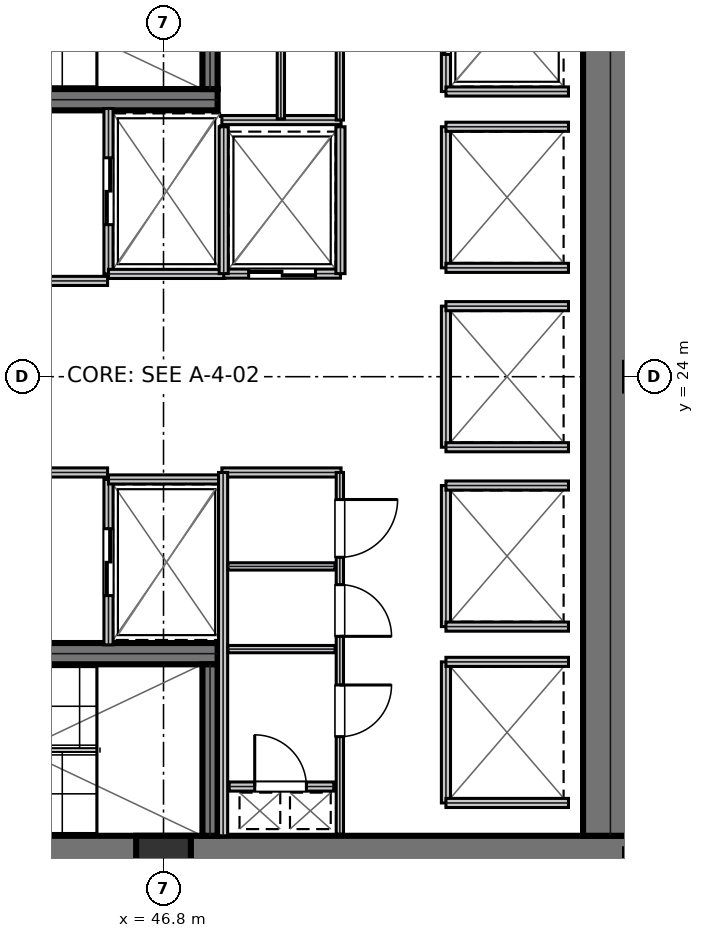
"""IFC4 building model, lengths in metres.
Left out: names, types, materials, properties, quantities, classifications, styles, units other than length and angle.
Written with IfcOpenShell. Run it as: python <this file> out.ifc"""

import sys

from ifc_helpers import new_model, si_unit, direction, frame, frame_2d, origin, origin_2d, place, context, subcontext, project, spatial, rectangle, extrude, element, fill, save


model = new_model("IFC4")
c1 = context("Model", 3, precision=1e-05, world=origin(), true_north=direction((0.0, 1.0)))
c2 = subcontext(c1, "Body", "Model", "MODEL_VIEW")
j1 = project(units=[si_unit("LENGTHUNIT", "METRE"), si_unit("PLANEANGLEUNIT", "RADIAN")], contexts=[c1])
p1 = place(None, origin())
s1 = spatial("IfcSite", under=j1, at=p1, CompositionType="ELEMENT")
p2 = place(p1, origin())
s2 = spatial("IfcBuilding", under=s1, at=p2, CompositionType="ELEMENT")
p3 = place(p2, frame((0.0, 0.0, 16.2)))
s3 = spatial("IfcBuildingStorey", under=s2, at=p3, CompositionType="ELEMENT", Elevation=16.2)
p4 = place(p3, frame((38.8, 16.0, 0.0), z_axis=(0.0, 0.0, 1.0), x_axis=(1.0, 0.0, 0.0)))
e1 = element("IfcWall", 1, at=p4, inside=s3, PredefinedType="SHEAR", context=c2, shape_type="SweptSolid", body=[
    extrude(rectangle(XDim=16.0, YDim=0.9, at=frame_2d((8.0, 0.0))), origin(), (0.0, 0.0, 1.0), 5.12),
])
p5 = place(p3, frame((54.15, 16.45, 0.0), z_axis=(0.0, 0.0, 1.0), x_axis=(0.0, 1.0, 0.0)))
e2 = element("IfcWall", 2, at=p5, inside=s3, PredefinedType="SHEAR", context=c2, shape_type="SweptSolid", body=[
    extrude(rectangle(XDim=15.1, YDim=0.9, at=frame_2d((7.55, 0.0))), origin(), (0.0, 0.0, 1.0), 5.12),
])
p6 = place(p3, frame((39.98, 28.555, 0.0), z_axis=(0.0, 0.0, 1.0), x_axis=(1.0, 0.0, 0.0)))
e3 = element("IfcWall", 3, at=p6, inside=s3, PredefinedType="SHEAR", context=c2, shape_type="SweptSolid", body=[
    extrude(rectangle(XDim=7.71, YDim=0.35, at=frame_2d((3.855, 0.0))), origin(), (0.0, 0.0, 1.0), 5.12),
])
p7 = place(p6, frame((0.25, 0.0, 0.0)))
e4 = element("IfcOpeningElement", 4, at=p7, cuts=e3, PredefinedType="OPENING", context=c2, shape_type="SweptSolid", body=[
    extrude(rectangle(XDim=1.1, YDim=2.15, at=frame_2d((0.55, 1.075))), frame((0.0, 0.185, 0.0), z_axis=(0.0, -1.0, 0.0), x_axis=(1.0, 0.0, 0.0)), (0.0, 0.0, 1.0), 0.37),
])
p8 = place(p3, frame((39.98, 19.445, 0.0), z_axis=(0.0, 0.0, 1.0), x_axis=(1.0, 0.0, 0.0)))
e5 = element("IfcWall", 5, at=p8, inside=s3, PredefinedType="SHEAR", context=c2, shape_type="SweptSolid", body=[
    extrude(rectangle(XDim=7.71, YDim=0.35, at=frame_2d((3.855, 0.0))), origin(), (0.0, 0.0, 1.0), 5.12),
])
p9 = place(p8, frame((0.25, 0.0, 0.0)))
e6 = element("IfcOpeningElement", 6, at=p9, cuts=e5, PredefinedType="OPENING", context=c2, shape_type="SweptSolid", body=[
    extrude(rectangle(XDim=1.1, YDim=2.15, at=frame_2d((0.55, 1.075))), frame((0.0, 0.185, 0.0), z_axis=(0.0, -1.0, 0.0), x_axis=(1.0, 0.0, 0.0)), (0.0, 0.0, 1.0), 0.37),
])
for number, where, z_axis, x_axis in (
    (7, (47.565, 28.73, 0.0), (0.0, 0.0, 1.0), (0.0, 1.0, 0.0)),
    (8, (47.565, 16.45, 0.0), (0.0, 0.0, 1.0), (0.0, 1.0, 0.0)),
):
    element("IfcWall", number, at=place(p3, frame(where, z_axis=z_axis, x_axis=x_axis)), inside=s3, PredefinedType="SHEAR", context=c2, shape_type="SweptSolid", body=[
        extrude(rectangle(XDim=2.82, YDim=0.25, at=frame_2d((1.41, 0.0))), origin(), (0.0, 0.0, 1.0), 5.12),
    ])
p10 = place(p3, frame((46.8, 16.0, 0.0), z_axis=(0.0, 0.0, 1.0), x_axis=(1.0, 0.0, 0.0)))
e9 = element("IfcColumn", 9, at=p10, inside=s3, PredefinedType="COLUMN", context=c2, shape_type="SweptSolid", body=[
    extrude(rectangle(XDim=0.9, YDim=0.9, at=origin_2d()), origin(), (0.0, 0.0, 1.0), 5.395),
])
p11 = place(p3, frame((39.98, 25.575, 0.0), z_axis=(0.0, 0.0, 1.0), x_axis=(1.0, 0.0, 0.0)))
e10 = element("IfcWall", 10, at=p11, inside=s3, PredefinedType="PARTITIONING", context=c2, shape_type="SweptSolid", body=[
    extrude(rectangle(XDim=5.9, YDim=0.15, at=frame_2d((2.95, 0.0))), origin(), (0.0, 0.0, 1.0), 5.12),
])
p12 = place(p11, frame((2.35, 0.0, 0.0)))
e11 = element("IfcOpeningElement", 11, at=p12, cuts=e10, PredefinedType="OPENING", context=c2, shape_type="SweptSolid", body=[
    extrude(rectangle(XDim=1.05, YDim=2.15, at=frame_2d((0.525, 1.075))), frame((0.0, 0.085, 0.0), z_axis=(0.0, -1.0, 0.0), x_axis=(1.0, 0.0, 0.0)), (0.0, 0.0, 1.0), 0.17),
])
p13 = place(p3, frame((39.98, 22.425, 0.0), z_axis=(0.0, 0.0, 1.0), x_axis=(1.0, 0.0, 0.0)))
e12 = element("IfcWall", 12, at=p13, inside=s3, PredefinedType="PARTITIONING", context=c2, shape_type="SweptSolid", body=[
    extrude(rectangle(XDim=5.9, YDim=0.15, at=frame_2d((2.95, 0.0))), origin(), (0.0, 0.0, 1.0), 5.12),
])
p14 = place(p13, frame((2.35, 0.0, 0.0)))
e13 = element("IfcOpeningElement", 13, at=p14, cuts=e12, PredefinedType="OPENING", context=c2, shape_type="SweptSolid", body=[
    extrude(rectangle(XDim=1.05, YDim=2.15, at=frame_2d((0.525, 1.075))), frame((0.0, 0.085, 0.0), z_axis=(0.0, -1.0, 0.0), x_axis=(1.0, 0.0, 0.0)), (0.0, 0.0, 1.0), 0.17),
])
p15 = place(p3, frame((45.895, 25.69, 0.0), z_axis=(0.0, 0.0, 1.0), x_axis=(0.0, 1.0, 0.0)))
e14 = element("IfcWall", 14, at=p15, inside=s3, PredefinedType="PARTITIONING", context=c2, shape_type="SweptSolid", body=[
    extrude(rectangle(XDim=2.72, YDim=0.15, at=frame_2d((1.36, 0.0))), origin(), (0.0, 0.0, 1.0), 5.12),
])
p16 = place(p15, frame((0.81, 0.0, 0.0)))
e15 = element("IfcOpeningElement", 15, at=p16, cuts=e14, PredefinedType="OPENING", context=c2, shape_type="SweptSolid", body=[
    extrude(rectangle(XDim=1.1, YDim=2.15, at=frame_2d((0.55, 1.075))), frame((0.0, 0.085, 0.0), z_axis=(0.0, -1.0, 0.0), x_axis=(1.0, 0.0, 0.0)), (0.0, 0.0, 1.0), 0.17),
])
p17 = place(p3, frame((45.895, 25.69, 0.0), z_axis=(0.0, 0.0, 1.0), x_axis=(1.0, 0.0, 0.0)))
e16 = element("IfcWall", 16, at=p17, inside=s3, PredefinedType="PARTITIONING", context=c2, shape_type="SweptSolid", body=[
    extrude(rectangle(XDim=1.915, YDim=0.15, at=frame_2d((0.958, 0.0))), origin(), (0.0, 0.0, 1.0), 5.12),
])
p18 = place(p3, frame((45.895, 19.59, 0.0), z_axis=(0.0, 0.0, 1.0), x_axis=(0.0, 1.0, 0.0)))
e17 = element("IfcWall", 17, at=p18, inside=s3, PredefinedType="PARTITIONING", context=c2, shape_type="SweptSolid", body=[
    extrude(rectangle(XDim=2.72, YDim=0.15, at=frame_2d((1.36, 0.0))), origin(), (0.0, 0.0, 1.0), 5.12),
])
p19 = place(p18, frame((0.81, 0.0, 0.0)))
e18 = element("IfcOpeningElement", 18, at=p19, cuts=e17, PredefinedType="OPENING", context=c2, shape_type="SweptSolid", body=[
    extrude(rectangle(XDim=1.1, YDim=2.15, at=frame_2d((0.55, 1.075))), frame((0.0, 0.085, 0.0), z_axis=(0.0, -1.0, 0.0), x_axis=(1.0, 0.0, 0.0)), (0.0, 0.0, 1.0), 0.17),
])
p20 = place(p3, frame((45.895, 22.31, 0.0), z_axis=(0.0, 0.0, 1.0), x_axis=(1.0, 0.0, 0.0)))
e19 = element("IfcWall", 19, at=p20, inside=s3, PredefinedType="PARTITIONING", context=c2, shape_type="SweptSolid", body=[
    extrude(rectangle(XDim=1.915, YDim=0.15, at=frame_2d((0.958, 0.0))), origin(), (0.0, 0.0, 1.0), 5.12),
])
p21 = place(p3, frame((47.79, 25.695, 0.0), z_axis=(0.0, 0.0, 1.0), x_axis=(1.0, 0.0, 0.0)))
e20 = element("IfcWall", 20, at=p21, inside=s3, PredefinedType="PARTITIONING", context=c2, shape_type="SweptSolid", body=[
    extrude(rectangle(XDim=1.92, YDim=0.15, at=frame_2d((0.96, 0.0))), origin(), (0.0, 0.0, 1.0), 5.12),
])
p22 = place(p21, frame((0.41, 0.0, 0.0)))
e21 = element("IfcOpeningElement", 21, at=p22, cuts=e20, PredefinedType="OPENING", context=c2, shape_type="SweptSolid", body=[
    extrude(rectangle(XDim=1.1, YDim=2.15, at=frame_2d((0.55, 1.075))), frame((0.0, 0.085, 0.0), z_axis=(0.0, -1.0, 0.0), x_axis=(1.0, 0.0, 0.0)), (0.0, 0.0, 1.0), 0.17),
])
for number, where, z_axis, x_axis in (
    (22, (47.79, 25.695, 0.0), (0.0, 0.0, 1.0), (0.0, 1.0, 0.0)),
    (23, (49.71, 25.695, 0.0), (0.0, 0.0, 1.0), (0.0, 1.0, 0.0)),
):
    element("IfcWall", number, at=place(p3, frame(where, z_axis=z_axis, x_axis=x_axis)), inside=s3, PredefinedType="PARTITIONING", context=c2, shape_type="SweptSolid", body=[
        extrude(rectangle(XDim=2.415, YDim=0.15, at=frame_2d((1.208, 0.0))), origin(), (0.0, 0.0, 1.0), 5.12),
    ])
p23 = place(p3, frame((51.445, 28.69, 0.0), z_axis=(0.0, 0.0, 1.0), x_axis=(0.0, 1.0, 0.0)))
e24 = element("IfcWall", 24, at=p23, inside=s3, PredefinedType="PARTITIONING", context=c2, shape_type="SweptSolid", body=[
    extrude(rectangle(XDim=2.32, YDim=0.15, at=frame_2d((1.16, 0.0))), origin(), (0.0, 0.0, 1.0), 5.12),
])
p24 = place(p23, frame((0.61, 0.0, 0.0)))
e25 = element("IfcOpeningElement", 25, at=p24, cuts=e24, PredefinedType="OPENING", context=c2, shape_type="SweptSolid", body=[
    extrude(rectangle(XDim=1.1, YDim=2.15, at=frame_2d((0.55, 1.075))), frame((0.0, 0.085, 0.0), z_axis=(0.0, -1.0, 0.0), x_axis=(1.0, 0.0, 0.0)), (0.0, 0.0, 1.0), 0.17),
])
p25 = place(p3, frame((51.445, 28.69, 0.0), z_axis=(0.0, 0.0, 1.0), x_axis=(1.0, 0.0, 0.0)))
e26 = element("IfcWall", 26, at=p25, inside=s3, PredefinedType="PARTITIONING", context=c2, shape_type="SweptSolid", body=[
    extrude(rectangle(XDim=2.015, YDim=0.15, at=frame_2d((1.007, 0.0))), origin(), (0.0, 0.0, 1.0), 5.12),
])
p26 = place(p3, frame((51.445, 25.79, 0.0), z_axis=(0.0, 0.0, 1.0), x_axis=(0.0, 1.0, 0.0)))
e27 = element("IfcWall", 27, at=p26, inside=s3, PredefinedType="PARTITIONING", context=c2, shape_type="SweptSolid", body=[
    extrude(rectangle(XDim=2.32, YDim=0.15, at=frame_2d((1.16, 0.0))), origin(), (0.0, 0.0, 1.0), 5.12),
])
for number, where, z_axis, x_axis in (
    (28, (51.445, 25.79, 0.0), (0.0, 0.0, 1.0), (1.0, 0.0, 0.0)),
    (29, (51.445, 28.11, 0.0), (0.0, 0.0, 1.0), (1.0, 0.0, 0.0)),
):
    element("IfcWall", number, at=place(p3, frame(where, z_axis=z_axis, x_axis=x_axis)), inside=s3, PredefinedType="PARTITIONING", context=c2, shape_type="SweptSolid", body=[
        extrude(rectangle(XDim=2.015, YDim=0.15, at=frame_2d((1.007, 0.0))), origin(), (0.0, 0.0, 1.0), 5.12),
    ])
p27 = place(p3, frame((51.445, 19.89, 0.0), z_axis=(0.0, 0.0, 1.0), x_axis=(0.0, 1.0, 0.0)))
e30 = element("IfcWall", 30, at=p27, inside=s3, PredefinedType="PARTITIONING", context=c2, shape_type="SweptSolid", body=[
    extrude(rectangle(XDim=2.32, YDim=0.15, at=frame_2d((1.16, 0.0))), origin(), (0.0, 0.0, 1.0), 5.12),
])
for number, where, z_axis, x_axis in (
    (31, (51.445, 19.89, 0.0), (0.0, 0.0, 1.0), (1.0, 0.0, 0.0)),
    (32, (51.445, 22.21, 0.0), (0.0, 0.0, 1.0), (1.0, 0.0, 0.0)),
):
    element("IfcWall", number, at=place(p3, frame(where, z_axis=z_axis, x_axis=x_axis)), inside=s3, PredefinedType="PARTITIONING", context=c2, shape_type="SweptSolid", body=[
        extrude(rectangle(XDim=2.015, YDim=0.15, at=frame_2d((1.007, 0.0))), origin(), (0.0, 0.0, 1.0), 5.12),
    ])
p28 = place(p3, frame((51.445, 22.84, 0.0), z_axis=(0.0, 0.0, 1.0), x_axis=(0.0, 1.0, 0.0)))
e33 = element("IfcWall", 33, at=p28, inside=s3, PredefinedType="PARTITIONING", context=c2, shape_type="SweptSolid", body=[
    extrude(rectangle(XDim=2.32, YDim=0.15, at=frame_2d((1.16, 0.0))), origin(), (0.0, 0.0, 1.0), 5.12),
])
for number, where, z_axis, x_axis in (
    (34, (51.445, 22.84, 0.0), (0.0, 0.0, 1.0), (1.0, 0.0, 0.0)),
    (35, (51.445, 25.16, 0.0), (0.0, 0.0, 1.0), (1.0, 0.0, 0.0)),
):
    element("IfcWall", number, at=place(p3, frame(where, z_axis=z_axis, x_axis=x_axis)), inside=s3, PredefinedType="PARTITIONING", context=c2, shape_type="SweptSolid", body=[
        extrude(rectangle(XDim=2.015, YDim=0.15, at=frame_2d((1.007, 0.0))), origin(), (0.0, 0.0, 1.0), 5.12),
    ])
p29 = place(p3, frame((51.445, 16.99, 0.0), z_axis=(0.0, 0.0, 1.0), x_axis=(0.0, 1.0, 0.0)))
e36 = element("IfcWall", 36, at=p29, inside=s3, PredefinedType="PARTITIONING", context=c2, shape_type="SweptSolid", body=[
    extrude(rectangle(XDim=2.32, YDim=0.15, at=frame_2d((1.16, 0.0))), origin(), (0.0, 0.0, 1.0), 5.12),
])
for number, where, z_axis, x_axis in (
    (37, (51.445, 16.99, 0.0), (0.0, 0.0, 1.0), (1.0, 0.0, 0.0)),
    (38, (51.445, 19.31, 0.0), (0.0, 0.0, 1.0), (1.0, 0.0, 0.0)),
):
    element("IfcWall", number, at=place(p3, frame(where, z_axis=z_axis, x_axis=x_axis)), inside=s3, PredefinedType="PARTITIONING", context=c2, shape_type="SweptSolid", body=[
        extrude(rectangle(XDim=2.015, YDim=0.15, at=frame_2d((1.007, 0.0))), origin(), (0.0, 0.0, 1.0), 5.12),
    ])
p30 = place(p3, frame((47.88, 17.26, 0.0), z_axis=(0.0, 0.0, 1.0), x_axis=(1.0, 0.0, 0.0)))
e39 = element("IfcWall", 39, at=p30, inside=s3, PredefinedType="PARTITIONING", context=c2, shape_type="SweptSolid", body=[
    extrude(rectangle(XDim=1.72, YDim=0.15, at=frame_2d((0.86, 0.0))), origin(), (0.0, 0.0, 1.0), 5.12),
])
p31 = place(p30, frame((0.42, 0.0, 0.0)))
e40 = element("IfcOpeningElement", 40, at=p31, cuts=e39, PredefinedType="OPENING", context=c2, shape_type="SweptSolid", body=[
    extrude(rectangle(XDim=0.85, YDim=2.15, at=frame_2d((0.425, 1.075))), frame((0.0, 0.085, 0.0), z_axis=(0.0, -1.0, 0.0), x_axis=(1.0, 0.0, 0.0)), (0.0, 0.0, 1.0), 0.17),
])
p32 = place(p3, frame((47.76, 22.425, 0.0), z_axis=(0.0, 0.0, 1.0), x_axis=(1.0, 0.0, 0.0)))
e41 = element("IfcWall", 41, at=p32, inside=s3, PredefinedType="PARTITIONING", context=c2, shape_type="SweptSolid", body=[
    extrude(rectangle(XDim=1.96, YDim=0.15, at=frame_2d((0.98, 0.0))), origin(), (0.0, 0.0, 1.0), 5.12),
])
p33 = place(p3, frame((47.78, 16.45, 0.0), z_axis=(0.0, 0.0, 1.0), x_axis=(0.0, 1.0, 0.0)))
e42 = element("IfcWall", 42, at=p33, inside=s3, PredefinedType="PARTITIONING", context=c2, shape_type="SweptSolid", body=[
    extrude(rectangle(XDim=5.975, YDim=0.15, at=frame_2d((2.988, 0.0))), origin(), (0.0, 0.0, 1.0), 5.12),
])
for number, where, z_axis, x_axis in (
    (43, (47.86, 19.52, 0.0), (0.0, 0.0, 1.0), (1.0, 0.0, 0.0)),
    (44, (47.86, 20.88, 0.0), (0.0, 0.0, 1.0), (1.0, 0.0, 0.0)),
):
    element("IfcWall", number, at=place(p3, frame(where, z_axis=z_axis, x_axis=x_axis)), inside=s3, PredefinedType="PARTITIONING", context=c2, shape_type="SweptSolid", body=[
        extrude(rectangle(XDim=1.76, YDim=0.12, at=frame_2d((0.88, 0.0))), origin(), (0.0, 0.0, 1.0), 5.12),
    ])
p34 = place(p3, frame((49.7, 16.48, 0.0), z_axis=(0.0, 0.0, 1.0), x_axis=(0.0, 1.0, 0.0)))
e45 = element("IfcWall", 45, at=p34, inside=s3, PredefinedType="PARTITIONING", context=c2, shape_type="SweptSolid", body=[
    extrude(rectangle(XDim=5.945, YDim=0.12, at=frame_2d((2.973, 0.0))), origin(), (0.0, 0.0, 1.0), 5.12),
])
p35 = place(p34, frame((1.6, 0.0, 0.0)))
e46 = element("IfcOpeningElement", 46, at=p35, cuts=e45, PredefinedType="OPENING", context=c2, shape_type="SweptSolid", body=[
    extrude(rectangle(XDim=0.85, YDim=2.15, at=frame_2d((0.425, 1.075))), frame((0.0, 0.07, 0.0), z_axis=(0.0, -1.0, 0.0), x_axis=(1.0, 0.0, 0.0)), (0.0, 0.0, 1.0), 0.14),
])
p36 = place(p34, frame((3.25, 0.0, 0.0)))
e47 = element("IfcOpeningElement", 47, at=p36, cuts=e45, PredefinedType="OPENING", context=c2, shape_type="SweptSolid", body=[
    extrude(rectangle(XDim=0.85, YDim=2.15, at=frame_2d((0.425, 1.075))), frame((0.0, 0.07, 0.0), z_axis=(0.0, -1.0, 0.0), x_axis=(1.0, 0.0, 0.0)), (0.0, 0.0, 1.0), 0.14),
])
p37 = place(p34, frame((4.55, 0.0, 0.0)))
e48 = element("IfcOpeningElement", 48, at=p37, cuts=e45, PredefinedType="OPENING", context=c2, shape_type="SweptSolid", body=[
    extrude(rectangle(XDim=0.95, YDim=2.15, at=frame_2d((0.475, 1.075))), frame((0.0, 0.07, 0.0), z_axis=(0.0, -1.0, 0.0), x_axis=(1.0, 0.0, 0.0)), (0.0, 0.0, 1.0), 0.14),
])
p38 = place(p3, frame((47.76, 28.22, 0.0), z_axis=(0.0, 0.0, 1.0), x_axis=(1.0, 0.0, 0.0)))
e49 = element("IfcWall", 49, at=p38, inside=s3, PredefinedType="PARTITIONING", context=c2, shape_type="SweptSolid", body=[
    extrude(rectangle(XDim=1.96, YDim=0.15, at=frame_2d((0.98, 0.0))), origin(), (0.0, 0.0, 1.0), 5.12),
])
p39 = place(p3, frame((48.73, 28.24, 0.0), z_axis=(0.0, 0.0, 1.0), x_axis=(0.0, 1.0, 0.0)))
e50 = element("IfcWall", 50, at=p39, inside=s3, PredefinedType="PARTITIONING", context=c2, shape_type="SweptSolid", body=[
    extrude(rectangle(XDim=3.28, YDim=0.12, at=frame_2d((1.64, 0.0))), origin(), (0.0, 0.0, 1.0), 5.12),
])
p40 = place(p39, frame((1.15, 0.0, 0.0)))
e51 = element("IfcOpeningElement", 51, at=p40, cuts=e50, PredefinedType="OPENING", context=c2, shape_type="SweptSolid", body=[
    extrude(rectangle(XDim=0.85, YDim=2.15, at=frame_2d((0.425, 1.075))), frame((0.0, 0.07, 0.0), z_axis=(0.0, -1.0, 0.0), x_axis=(1.0, 0.0, 0.0)), (0.0, 0.0, 1.0), 0.14),
])
p41 = place(p3, frame((49.7, 28.22, 0.0), z_axis=(0.0, 0.0, 1.0), x_axis=(0.0, 1.0, 0.0)))
e52 = element("IfcWall", 52, at=p41, inside=s3, PredefinedType="PARTITIONING", context=c2, shape_type="SweptSolid", body=[
    extrude(rectangle(XDim=3.3, YDim=0.12, at=frame_2d((1.65, 0.0))), origin(), (0.0, 0.0, 1.0), 5.12),
])
p42 = place(p41, frame((1.15, 0.0, 0.0)))
e53 = element("IfcOpeningElement", 53, at=p42, cuts=e52, PredefinedType="OPENING", context=c2, shape_type="SweptSolid", body=[
    extrude(rectangle(XDim=0.85, YDim=2.15, at=frame_2d((0.425, 1.075))), frame((0.0, 0.07, 0.0), z_axis=(0.0, -1.0, 0.0), x_axis=(1.0, 0.0, 0.0)), (0.0, 0.0, 1.0), 0.14),
])
p43 = place(p16, frame((1.1, 0.0, 0.0), z_axis=(0.0, 0.0, 1.0), x_axis=(-1.0, 0.0, 0.0)))
e54 = element("IfcDoor", 54, at=p43, inside=s3, OperationType="DOUBLE_DOOR_SLIDING", PredefinedType="DOOR", context=c2, shape_type="SweptSolid", body=[
    extrude(rectangle(XDim=1.1, YDim=2.15, at=frame_2d((0.55, 1.075))), frame((0.0, 0.025, 0.0), z_axis=(0.0, -1.0, 0.0), x_axis=(1.0, 0.0, 0.0)), (0.0, 0.0, 1.0), 0.05),
])
fill(e15, e54)
p44 = place(p19, frame((1.1, 0.0, 0.0), z_axis=(0.0, 0.0, 1.0), x_axis=(-1.0, 0.0, 0.0)))
e55 = element("IfcDoor", 55, at=p44, inside=s3, OperationType="DOUBLE_DOOR_SLIDING", PredefinedType="DOOR", context=c2, shape_type="SweptSolid", body=[
    extrude(rectangle(XDim=1.1, YDim=2.15, at=frame_2d((0.55, 1.075))), frame((0.0, 0.025, 0.0), z_axis=(0.0, -1.0, 0.0), x_axis=(1.0, 0.0, 0.0)), (0.0, 0.0, 1.0), 0.05),
])
fill(e18, e55)
p45 = place(p22, frame((1.1, 0.0, 0.0), z_axis=(0.0, 0.0, 1.0), x_axis=(-1.0, 0.0, 0.0)))
e56 = element("IfcDoor", 56, at=p45, inside=s3, OperationType="DOUBLE_DOOR_SLIDING", PredefinedType="DOOR", context=c2, shape_type="SweptSolid", body=[
    extrude(rectangle(XDim=1.1, YDim=2.15, at=frame_2d((0.55, 1.075))), frame((0.0, 0.025, 0.0), z_axis=(0.0, -1.0, 0.0), x_axis=(1.0, 0.0, 0.0)), (0.0, 0.0, 1.0), 0.05),
])
fill(e21, e56)
p46 = place(p24, frame((1.1, 0.0, 0.0), z_axis=(0.0, 0.0, 1.0), x_axis=(-1.0, 0.0, 0.0)))
e57 = element("IfcDoor", 57, at=p46, inside=s3, OperationType="DOUBLE_DOOR_SLIDING", PredefinedType="DOOR", context=c2, shape_type="SweptSolid", body=[
    extrude(rectangle(XDim=1.1, YDim=2.15, at=frame_2d((0.55, 1.075))), frame((0.0, 0.025, 0.0), z_axis=(0.0, -1.0, 0.0), x_axis=(1.0, 0.0, 0.0)), (0.0, 0.0, 1.0), 0.05),
])
fill(e25, e57)
p47 = place(p31, origin())
e58 = element("IfcDoor", 58, at=p47, inside=s3, OperationType="SINGLE_SWING_LEFT", PredefinedType="TRAPDOOR", context=c2, shape_type="SweptSolid", body=[
    extrude(rectangle(XDim=0.85, YDim=2.15, at=frame_2d((0.425, 1.075))), frame((0.0, 0.025, 0.0), z_axis=(0.0, -1.0, 0.0), x_axis=(1.0, 0.0, 0.0)), (0.0, 0.0, 1.0), 0.05),
])
fill(e40, e58)
p48 = place(p35, frame((0.85, 0.0, 0.0), z_axis=(0.0, 0.0, 1.0), x_axis=(-1.0, 0.0, 0.0)))
e59 = element("IfcDoor", 59, at=p48, inside=s3, OperationType="SINGLE_SWING_LEFT", PredefinedType="DOOR", context=c2, shape_type="SweptSolid", body=[
    extrude(rectangle(XDim=0.85, YDim=2.15, at=frame_2d((0.425, 1.075))), frame((0.0, 0.025, 0.0), z_axis=(0.0, -1.0, 0.0), x_axis=(1.0, 0.0, 0.0)), (0.0, 0.0, 1.0), 0.05),
])
fill(e46, e59)
p49 = place(p36, frame((0.85, 0.0, 0.0), z_axis=(0.0, 0.0, 1.0), x_axis=(-1.0, 0.0, 0.0)))
e60 = element("IfcDoor", 60, at=p49, inside=s3, OperationType="SINGLE_SWING_RIGHT", PredefinedType="DOOR", context=c2, shape_type="SweptSolid", body=[
    extrude(rectangle(XDim=0.85, YDim=2.15, at=frame_2d((0.425, 1.075))), frame((0.0, 0.025, 0.0), z_axis=(0.0, -1.0, 0.0), x_axis=(1.0, 0.0, 0.0)), (0.0, 0.0, 1.0), 0.05),
])
fill(e47, e60)
p50 = place(p37, frame((0.95, 0.0, 0.0), z_axis=(0.0, 0.0, 1.0), x_axis=(-1.0, 0.0, 0.0)))
e61 = element("IfcDoor", 61, at=p50, inside=s3, OperationType="SINGLE_SWING_LEFT", PredefinedType="DOOR", context=c2, shape_type="SweptSolid", body=[
    extrude(rectangle(XDim=0.95, YDim=2.15, at=frame_2d((0.475, 1.075))), frame((0.0, 0.025, 0.0), z_axis=(0.0, -1.0, 0.0), x_axis=(1.0, 0.0, 0.0)), (0.0, 0.0, 1.0), 0.05),
])
fill(e48, e61)
save(model, sys.argv[1])
